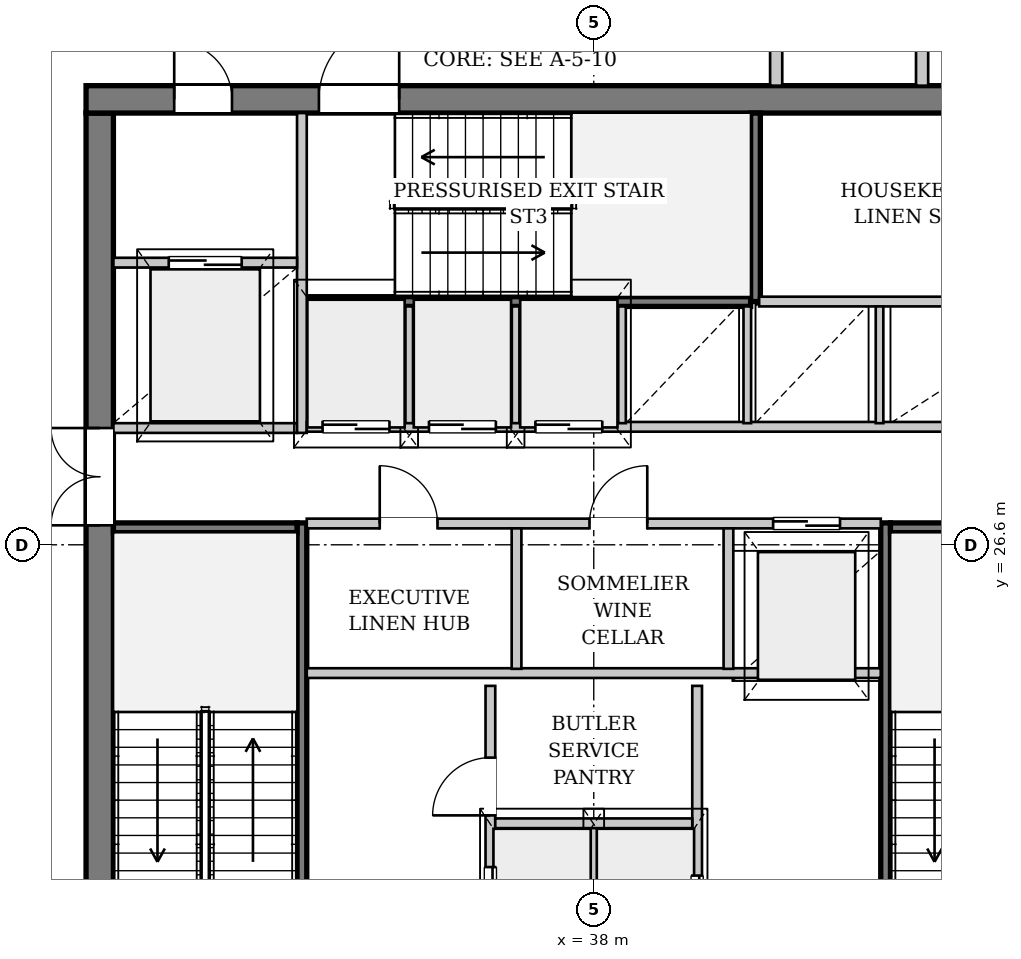
"""IFC4 building model, lengths in metres.
Left out: names, types, materials, properties, quantities, classifications, styles, units other than length and angle.
Written with IfcOpenShell. Run it as: python <this file> out.ifc"""

import sys

from ifc_helpers import new_model, si_unit, direction, frame, frame_2d, origin, place, context, subcontext, project, spatial, rectangle, extrude, source, transform, mapped, element, fill, save


model = new_model("IFC4")
c1 = context("Model", 3, precision=1e-05, world=origin(), true_north=direction((0.0, 1.0)))
c2 = subcontext(c1, "Body", "Model", "MODEL_VIEW")
j1 = project(units=[si_unit("LENGTHUNIT", "METRE"), si_unit("PLANEANGLEUNIT", "RADIAN")], contexts=[c1])
p1 = place(None, origin())
s1 = spatial("IfcSite", under=j1, at=p1, CompositionType="ELEMENT")
p2 = place(p1, origin())
s2 = spatial("IfcBuilding", under=s1, at=p2, CompositionType="ELEMENT")
p3 = place(p2, frame((0.0, 0.0, 213.15)))
s3 = spatial("IfcBuildingStorey", under=s2, at=p3, CompositionType="ELEMENT", Elevation=213.15)
p4 = place(p3, frame((52.923, 23.425, 0.0), z_axis=(0.0, 0.0, 1.0), x_axis=(-0.482829200204, -0.875714544489, 0.0)))
e1 = element("IfcWall", 1, at=p4, inside=s3, PredefinedType="SOLIDWALL", context=c2, shape_type="SweptSolid", body=[
    extrude(rectangle(XDim=23.072, YDim=0.32, at=frame_2d((11.536, 0.0))), origin(), (0.0, 0.0, 1.0), 2.822),
])
p5 = place(p4, frame((6.633, 0.0, 0.0)))
e2 = element("IfcOpeningElement", 2, at=p5, cuts=e1, PredefinedType="OPENING", context=c2, shape_type="SweptSolid", body=[
    extrude(rectangle(XDim=1.5, YDim=2.3, at=frame_2d((0.75, 1.15))), frame((0.0, 0.17, 0.0), z_axis=(0.0, -1.0, 0.0), x_axis=(1.0, 0.0, 0.0)), (0.0, 0.0, 1.0), 0.34),
])
p6 = place(p4, frame((15.773, 0.0, 0.352)))
e3 = element("IfcOpeningElement", 3, at=p6, cuts=e1, PredefinedType="OPENING", context=c2, shape_type="SweptSolid", body=[
    extrude(rectangle(XDim=2.6, YDim=2.35, at=frame_2d((1.3, 1.175))), frame((0.0, 0.17, 0.0), z_axis=(0.0, -1.0, 0.0), x_axis=(1.0, 0.0, 0.0)), (0.0, 0.0, 1.0), 0.34),
])
p7 = place(p3, frame((15.745, 32.294, 0.0), z_axis=(0.0, 0.0, 1.0), x_axis=(0.900909174289, 0.434007672377, 0.0)))
e4 = element("IfcWall", 4, at=p7, inside=s3, PredefinedType="SOLIDWALL", context=c2, shape_type="SweptSolid", body=[
    extrude(rectangle(XDim=22.511, YDim=0.38, at=frame_2d((11.256, 0.0))), origin(), (0.0, 0.0, 1.0), 2.822),
])
p8 = place(p7, frame((5.653, 0.0, 0.452)))
e5 = element("IfcOpeningElement", 5, at=p8, cuts=e4, PredefinedType="OPENING", context=c2, shape_type="SweptSolid", body=[
    extrude(rectangle(XDim=2.2, YDim=2.25, at=frame_2d((1.1, 1.125))), frame((0.0, 0.2, 0.0), z_axis=(0.0, -1.0, 0.0), x_axis=(1.0, 0.0, 0.0)), (0.0, 0.0, 1.0), 0.4),
])
p9 = place(p7, frame((15.108, 0.0, 0.452)))
e6 = element("IfcOpeningElement", 6, at=p9, cuts=e4, PredefinedType="OPENING", context=c2, shape_type="SweptSolid", body=[
    extrude(rectangle(XDim=2.2, YDim=2.25, at=frame_2d((1.1, 1.125))), frame((0.0, 0.2, 0.0), z_axis=(0.0, -1.0, 0.0), x_axis=(1.0, 0.0, 0.0)), (0.0, 0.0, 1.0), 0.4),
])
p10 = place(p3, frame((42.991, 3.451, 0.0), z_axis=(0.0, 0.0, 1.0), x_axis=(0.477647289854, 0.878551686866, 0.0)))
e7 = element("IfcWall", 7, at=p10, inside=s3, PredefinedType="PARAPET", context=c2, shape_type="SweptSolid", body=[
    extrude(rectangle(XDim=20.551, YDim=0.22, at=frame_2d((10.275, 0.0))), origin(), (0.0, 0.0, 1.0), 0.3),
])
p11 = place(p3, frame((29.875, 19.5, 0.0), z_axis=(0.0, 0.0, 1.0), x_axis=(0.0, 1.0, 0.0)))
e8 = element("IfcWall", 8, at=p11, inside=s3, PredefinedType="SHEAR", context=c2, shape_type="SweptSolid", body=[
    extrude(rectangle(XDim=14.2, YDim=0.45, at=frame_2d((7.1, 0.0))), origin(), (0.0, 0.0, 1.0), 3.33),
])
p12 = place(p11, frame((7.42, 0.0, 0.0)))
e9 = element("IfcOpeningElement", 9, at=p12, cuts=e8, PredefinedType="OPENING", context=c2, shape_type="SweptSolid", body=[
    extrude(rectangle(XDim=1.6, YDim=2.2, at=frame_2d((0.8, 1.1))), frame((0.0, 0.235, 0.0), z_axis=(0.0, -1.0, 0.0), x_axis=(1.0, 0.0, 0.0)), (0.0, 0.0, 1.0), 0.47),
])
p13 = place(p3, frame((29.65, 33.925, 0.0), z_axis=(0.0, 0.0, 1.0), x_axis=(1.0, 0.0, 0.0)))
e10 = element("IfcWall", 10, at=p13, inside=s3, PredefinedType="SHEAR", context=c2, shape_type="SweptSolid", body=[
    extrude(rectangle(XDim=16.7, YDim=0.45, at=frame_2d((8.35, 0.0))), origin(), (0.0, 0.0, 1.0), 3.33),
])
p14 = place(p13, frame((1.45, 0.0, 0.0)))
e11 = element("IfcOpeningElement", 11, at=p14, cuts=e10, PredefinedType="OPENING", context=c2, shape_type="SweptSolid", body=[
    extrude(rectangle(XDim=0.95, YDim=2.1, at=frame_2d((0.475, 1.05))), frame((0.0, 0.235, 0.0), z_axis=(0.0, -1.0, 0.0), x_axis=(1.0, 0.0, 0.0)), (0.0, 0.0, 1.0), 0.47),
])
p15 = place(p13, frame((3.83, 0.0, 0.0)))
e12 = element("IfcOpeningElement", 12, at=p15, cuts=e10, PredefinedType="OPENING", context=c2, shape_type="SweptSolid", body=[
    extrude(rectangle(XDim=1.32, YDim=2.2, at=frame_2d((0.66, 1.1))), frame((0.0, 0.235, 0.0), z_axis=(0.0, -1.0, 0.0), x_axis=(1.0, 0.0, 0.0)), (0.0, 0.0, 1.0), 0.47),
])
p16 = place(p3, frame((33.2, 19.5, 0.0), z_axis=(0.0, 0.0, 1.0), x_axis=(0.0, 1.0, 0.0)))
e13 = element("IfcWall", 13, at=p16, inside=s3, PredefinedType="PARTITIONING", context=c2, shape_type="SweptSolid", body=[
    extrude(rectangle(XDim=7.46, YDim=0.16, at=frame_2d((3.73, 0.0))), origin(), (0.0, 0.0, 1.0), 3.33),
])
p17 = place(p16, frame((0.08, 0.0, 0.0)))
e14 = element("IfcOpeningElement", 14, at=p17, cuts=e13, PredefinedType="OPENING", context=c2, shape_type="SweptSolid", body=[
    extrude(rectangle(XDim=1.32, YDim=2.2, at=frame_2d((0.66, 1.1))), frame((0.0, 0.09, 0.0), z_axis=(0.0, -1.0, 0.0), x_axis=(1.0, 0.0, 0.0)), (0.0, 0.0, 1.0), 0.18),
])
p18 = place(p3, frame((30.1, 26.88, 0.0), z_axis=(0.0, 0.0, 1.0), x_axis=(1.0, 0.0, 0.0)))
e15 = element("IfcWall", 15, at=p18, inside=s3, PredefinedType="PARTITIONING", context=c2, shape_type="SweptSolid", body=[
    extrude(rectangle(XDim=3.02, YDim=0.16, at=frame_2d((1.51, 0.0))), origin(), (0.0, 0.0, 1.0), 3.33),
])
p19 = place(p3, frame((42.8, 26.96, 0.0), z_axis=(0.0, 0.0, 1.0), x_axis=(0.0, -1.0, 0.0)))
e16 = element("IfcWall", 16, at=p19, inside=s3, PredefinedType="PARTITIONING", context=c2, shape_type="SweptSolid", body=[
    extrude(rectangle(XDim=7.46, YDim=0.16, at=frame_2d((3.73, 0.0))), origin(), (0.0, 0.0, 1.0), 3.33),
])
p20 = place(p19, frame((6.06, 0.0, 0.0)))
e17 = element("IfcOpeningElement", 17, at=p20, cuts=e16, PredefinedType="OPENING", context=c2, shape_type="SweptSolid", body=[
    extrude(rectangle(XDim=1.32, YDim=2.2, at=frame_2d((0.66, 1.1))), frame((0.0, 0.09, 0.0), z_axis=(0.0, -1.0, 0.0), x_axis=(1.0, 0.0, 0.0)), (0.0, 0.0, 1.0), 0.18),
])
p21 = place(p3, frame((42.88, 26.88, 0.0), z_axis=(0.0, 0.0, 1.0), x_axis=(1.0, 0.0, 0.0)))
e18 = element("IfcWall", 18, at=p21, inside=s3, PredefinedType="PARTITIONING", context=c2, shape_type="SweptSolid", body=[
    extrude(rectangle(XDim=3.02, YDim=0.16, at=frame_2d((1.51, 0.0))), origin(), (0.0, 0.0, 1.0), 3.33),
])
p22 = place(p3, frame((33.28, 30.6, 0.0), z_axis=(0.0, 0.0, 1.0), x_axis=(1.0, 0.0, 0.0)))
e19 = element("IfcWall", 19, at=p22, inside=s3, PredefinedType="PARTITIONING", context=c2, shape_type="SweptSolid", body=[
    extrude(rectangle(XDim=7.3, YDim=0.16, at=frame_2d((3.65, 0.0))), origin(), (0.0, 0.0, 1.0), 3.33),
])
p23 = place(p3, frame((40.66, 30.6, 0.0), z_axis=(0.0, 0.0, 1.0), x_axis=(0.0, 1.0, 0.0)))
e20 = element("IfcWall", 20, at=p23, inside=s3, PredefinedType="PARTITIONING", context=c2, shape_type="SweptSolid", body=[
    extrude(rectangle(XDim=3.1, YDim=0.16, at=frame_2d((1.55, 0.0))), origin(), (0.0, 0.0, 1.0), 3.33),
])
p24 = place(p3, frame((36.3, 19.5, 0.0), z_axis=(0.0, 0.0, 1.0), x_axis=(0.0, 1.0, 0.0)))
e21 = element("IfcWall", 21, at=p24, inside=s3, PredefinedType="PARTITIONING", context=c2, shape_type="SweptSolid", body=[
    extrude(rectangle(XDim=4.78, YDim=0.16, at=frame_2d((2.39, 0.0))), origin(), (0.0, 0.0, 1.0), 3.33),
])
p25 = place(p24, frame((0.6, 0.0, 0.0)))
e22 = element("IfcOpeningElement", 22, at=p25, cuts=e21, PredefinedType="OPENING", context=c2, shape_type="SweptSolid", body=[
    extrude(rectangle(XDim=1.2, YDim=2.2, at=frame_2d((0.6, 1.1))), frame((0.0, 0.09, 0.0), z_axis=(0.0, -1.0, 0.0), x_axis=(1.0, 0.0, 0.0)), (0.0, 0.0, 1.0), 0.18),
])
p26 = place(p24, frame((2.65, 0.0, 0.0)))
e23 = element("IfcOpeningElement", 23, at=p26, cuts=e21, PredefinedType="OPENING", context=c2, shape_type="SweptSolid", body=[
    extrude(rectangle(XDim=0.95, YDim=2.1, at=frame_2d((0.475, 1.05))), frame((0.0, 0.09, 0.0), z_axis=(0.0, -1.0, 0.0), x_axis=(1.0, 0.0, 0.0)), (0.0, 0.0, 1.0), 0.18),
])
p27 = place(p3, frame((39.7, 24.28, 0.0), z_axis=(0.0, 0.0, 1.0), x_axis=(0.0, -1.0, 0.0)))
e24 = element("IfcWall", 24, at=p27, inside=s3, PredefinedType="PARTITIONING", context=c2, shape_type="SweptSolid", body=[
    extrude(rectangle(XDim=4.78, YDim=0.16, at=frame_2d((2.39, 0.0))), origin(), (0.0, 0.0, 1.0), 3.33),
])
p28 = place(p27, frame((3.12, 0.0, 0.0)))
e25 = element("IfcOpeningElement", 25, at=p28, cuts=e24, PredefinedType="OPENING", context=c2, shape_type="SweptSolid", body=[
    extrude(rectangle(XDim=1.2, YDim=2.2, at=frame_2d((0.6, 1.1))), frame((0.0, 0.09, 0.0), z_axis=(0.0, -1.0, 0.0), x_axis=(1.0, 0.0, 0.0)), (0.0, 0.0, 1.0), 0.18),
])
p29 = place(p3, frame((38.0, 19.5, 0.0), z_axis=(0.0, 0.0, 1.0), x_axis=(0.0, 1.0, 0.0)))
e26 = element("IfcWall", 26, at=p29, inside=s3, PredefinedType="PARTITIONING", context=c2, shape_type="SweptSolid", body=[
    extrude(rectangle(XDim=2.46, YDim=0.125, at=frame_2d((1.23, 0.0))), origin(), (0.0, 0.0, 1.0), 3.33),
])
p30 = place(p3, frame((36.38, 22.02, 0.0), z_axis=(0.0, 0.0, 1.0), x_axis=(1.0, 0.0, 0.0)))
e27 = element("IfcWall", 27, at=p30, inside=s3, PredefinedType="PARTITIONING", context=c2, shape_type="SweptSolid", body=[
    extrude(rectangle(XDim=3.24, YDim=0.16, at=frame_2d((1.62, 0.0))), origin(), (0.0, 0.0, 1.0), 3.33),
])
p31 = place(p3, frame((33.28, 24.49, 0.0), z_axis=(0.0, 0.0, 1.0), x_axis=(1.0, 0.0, 0.0)))
e28 = element("IfcWall", 28, at=p31, inside=s3, PredefinedType="PARTITIONING", context=c2, shape_type="SweptSolid", body=[
    extrude(rectangle(XDim=9.44, YDim=0.16, at=frame_2d((4.72, 0.0))), origin(), (0.0, 0.0, 1.0), 3.33),
])
p32 = place(p3, frame((30.1, 28.52, 0.0), z_axis=(0.0, 0.0, 1.0), x_axis=(1.0, 0.0, 0.0)))
e29 = element("IfcWall", 29, at=p32, inside=s3, PredefinedType="PARTITIONING", context=c2, shape_type="SweptSolid", body=[
    extrude(rectangle(XDim=3.02, YDim=0.16, at=frame_2d((1.51, 0.0))), origin(), (0.0, 0.0, 1.0), 3.33),
])
p33 = place(p3, frame((33.2, 28.44, 0.0), z_axis=(0.0, 0.0, 1.0), x_axis=(0.0, 1.0, 0.0)))
e30 = element("IfcWall", 30, at=p33, inside=s3, PredefinedType="PARTITIONING", context=c2, shape_type="SweptSolid", body=[
    extrude(rectangle(XDim=5.26, YDim=0.16, at=frame_2d((2.63, 0.0))), origin(), (0.0, 0.0, 1.0), 3.33),
])
p34 = place(p3, frame((30.1, 31.24, 0.0), z_axis=(0.0, 0.0, 1.0), x_axis=(1.0, 0.0, 0.0)))
e31 = element("IfcWall", 31, at=p34, inside=s3, PredefinedType="PARTITIONING", context=c2, shape_type="SweptSolid", body=[
    extrude(rectangle(XDim=3.02, YDim=0.16, at=frame_2d((1.51, 0.0))), origin(), (0.0, 0.0, 1.0), 3.33),
])
p35 = place(p34, frame((0.91, 0.0, 0.0)))
e32 = element("IfcOpeningElement", 32, at=p35, cuts=e31, PredefinedType="OPENING", context=c2, shape_type="SweptSolid", body=[
    extrude(rectangle(XDim=1.2, YDim=2.2, at=frame_2d((0.6, 1.1))), frame((0.0, 0.09, 0.0), z_axis=(0.0, -1.0, 0.0), x_axis=(1.0, 0.0, 0.0)), (0.0, 0.0, 1.0), 0.18),
])
p36 = place(p3, frame((33.28, 26.95, 0.0), z_axis=(0.0, 0.0, 1.0), x_axis=(1.0, 0.0, 0.0)))
e33 = element("IfcWall", 33, at=p36, inside=s3, PredefinedType="PARTITIONING", context=c2, shape_type="SweptSolid", body=[
    extrude(rectangle(XDim=9.44, YDim=0.16, at=frame_2d((4.72, 0.0))), origin(), (0.0, 0.0, 1.0), 3.33),
])
p37 = place(p36, frame((1.2, 0.0, 0.0)))
e34 = element("IfcOpeningElement", 34, at=p37, cuts=e33, PredefinedType="OPENING", context=c2, shape_type="SweptSolid", body=[
    extrude(rectangle(XDim=0.95, YDim=2.1, at=frame_2d((0.475, 1.05))), frame((0.0, 0.09, 0.0), z_axis=(0.0, -1.0, 0.0), x_axis=(1.0, 0.0, 0.0)), (0.0, 0.0, 1.0), 0.18),
])
p38 = place(p36, frame((4.65, 0.0, 0.0)))
e35 = element("IfcOpeningElement", 35, at=p38, cuts=e33, PredefinedType="OPENING", context=c2, shape_type="SweptSolid", body=[
    extrude(rectangle(XDim=0.95, YDim=2.1, at=frame_2d((0.475, 1.05))), frame((0.0, 0.09, 0.0), z_axis=(0.0, -1.0, 0.0), x_axis=(1.0, 0.0, 0.0)), (0.0, 0.0, 1.0), 0.18),
])
p39 = place(p36, frame((7.67, 0.0, 0.0)))
e36 = element("IfcOpeningElement", 36, at=p39, cuts=e33, PredefinedType="OPENING", context=c2, shape_type="SweptSolid", body=[
    extrude(rectangle(XDim=1.1, YDim=2.2, at=frame_2d((0.55, 1.1))), frame((0.0, 0.09, 0.0), z_axis=(0.0, -1.0, 0.0), x_axis=(1.0, 0.0, 0.0)), (0.0, 0.0, 1.0), 0.18),
])
for number, where, z_axis, x_axis in (
    (37, (36.73, 24.56, 0.0), (0.0, 0.0, 1.0), (0.0, 1.0, 0.0)),
    (38, (40.215, 24.56, 0.0), (0.0, 0.0, 1.0), (0.0, 1.0, 0.0)),
):
    element("IfcWall", number, at=place(p3, frame(where, z_axis=z_axis, x_axis=x_axis)), inside=s3, PredefinedType="PARTITIONING", context=c2, shape_type="SweptSolid", body=[
        extrude(rectangle(XDim=2.31, YDim=0.16, at=frame_2d((1.155, 0.0))), origin(), (0.0, 0.0, 1.0), 3.33),
    ])
p40 = place(p3, frame((33.28, 28.54, 0.0), z_axis=(0.0, 0.0, 1.0), x_axis=(1.0, 0.0, 0.0)))
e39 = element("IfcWall", 39, at=p40, inside=s3, PredefinedType="PARTITIONING", context=c2, shape_type="SweptSolid", body=[
    extrude(rectangle(XDim=12.62, YDim=0.16, at=frame_2d((6.31, 0.0))), origin(), (0.0, 0.0, 1.0), 3.33),
])
p41 = place(p40, frame((0.26, 0.0, 0.0)))
e40 = element("IfcOpeningElement", 40, at=p41, cuts=e39, PredefinedType="OPENING", context=c2, shape_type="SweptSolid", body=[
    extrude(rectangle(XDim=1.1, YDim=2.2, at=frame_2d((0.55, 1.1))), frame((0.0, 0.09, 0.0), z_axis=(0.0, -1.0, 0.0), x_axis=(1.0, 0.0, 0.0)), (0.0, 0.0, 1.0), 0.18),
])
p42 = place(p40, frame((2.01, 0.0, 0.0)))
e41 = element("IfcOpeningElement", 41, at=p42, cuts=e39, PredefinedType="OPENING", context=c2, shape_type="SweptSolid", body=[
    extrude(rectangle(XDim=1.1, YDim=2.2, at=frame_2d((0.55, 1.1))), frame((0.0, 0.09, 0.0), z_axis=(0.0, -1.0, 0.0), x_axis=(1.0, 0.0, 0.0)), (0.0, 0.0, 1.0), 0.18),
])
p43 = place(p40, frame((3.76, 0.0, 0.0)))
e42 = element("IfcOpeningElement", 42, at=p43, cuts=e39, PredefinedType="OPENING", context=c2, shape_type="SweptSolid", body=[
    extrude(rectangle(XDim=1.1, YDim=2.2, at=frame_2d((0.55, 1.1))), frame((0.0, 0.09, 0.0), z_axis=(0.0, -1.0, 0.0), x_axis=(1.0, 0.0, 0.0)), (0.0, 0.0, 1.0), 0.18),
])
p44 = place(p3, frame((40.72, 30.6, 0.0), z_axis=(0.0, 0.0, 1.0), x_axis=(1.0, 0.0, 0.0)))
e43 = element("IfcWall", 43, at=p44, inside=s3, PredefinedType="PARTITIONING", context=c2, shape_type="SweptSolid", body=[
    extrude(rectangle(XDim=5.18, YDim=0.16, at=frame_2d((2.59, 0.0))), origin(), (0.0, 0.0, 1.0), 3.33),
])
for number, where, z_axis, x_axis in (
    (44, (34.965, 28.6, 0.0), (0.0, 0.0, 1.0), (0.0, 1.0, 0.0)),
    (45, (36.715, 28.6, 0.0), (0.0, 0.0, 1.0), (0.0, 1.0, 0.0)),
    (46, (38.465, 28.6, 0.0), (0.0, 0.0, 1.0), (0.0, 1.0, 0.0)),
    (47, (40.525, 28.6, 0.0), (0.0, 0.0, 1.0), (0.0, 1.0, 0.0)),
    (48, (42.7, 28.6, 0.0), (0.0, 0.0, 1.0), (0.0, 1.0, 0.0)),
):
    element("IfcWall", number, at=place(p3, frame(where, z_axis=z_axis, x_axis=x_axis)), inside=s3, PredefinedType="PARTITIONING", context=c2, shape_type="SweptSolid", body=[
        extrude(rectangle(XDim=1.92, YDim=0.125, at=frame_2d((0.96, 0.0))), origin(), (0.0, 0.0, 1.0), 3.33),
    ])
for number, where, z_axis, x_axis in (
    (49, (41.0, 34.15, 0.0), (0.0, 0.0, 1.0), (0.0, 1.0, 0.0)),
    (50, (43.4, 34.15, 0.0), (0.0, 0.0, 1.0), (0.0, 1.0, 0.0)),
):
    element("IfcWall", number, at=place(p3, frame(where, z_axis=z_axis, x_axis=x_axis)), inside=s3, PredefinedType="PARTITIONING", context=c2, shape_type="SweptSolid", body=[
        extrude(rectangle(XDim=1.85, YDim=0.2, at=frame_2d((0.925, 0.0))), origin(), (0.0, 0.0, 1.0), 3.33),
    ])
m1 = source(origin(), c2, "Body", "SweptSolid", [
    extrude(rectangle(XDim=1.6, YDim=2.2, at=frame_2d((0.8, 1.1))), frame((0.0, 0.025, 0.0), z_axis=(0.0, -1.0, 0.0), x_axis=(1.0, 0.0, 0.0)), (0.0, 0.0, 1.0), 0.05),
])
p45 = place(p12, origin())
e51 = element("IfcDoor", 51, at=p45, inside=s3, OperationType="DOUBLE_DOOR_SINGLE_SWING", PredefinedType="DOOR", context=c2, shape_type="MappedRepresentation", body=[
    mapped(m1, transform((0.0, 0.0, 0.0), x_axis=(1.0, 0.0, 0.0), y_axis=(0.0, 1.0, 0.0), z_axis=(0.0, 0.0, 1.0), scale=1.0)),
])
fill(e9, e51)
m2 = source(origin(), c2, "Body", "SweptSolid", [
    extrude(rectangle(XDim=0.95, YDim=2.1, at=frame_2d((0.475, 1.05))), frame((0.0, 0.025, 0.0), z_axis=(0.0, -1.0, 0.0), x_axis=(1.0, 0.0, 0.0)), (0.0, 0.0, 1.0), 0.05),
])
p46 = place(p14, origin())
e52 = element("IfcDoor", 52, at=p46, inside=s3, OperationType="SINGLE_SWING_LEFT", PredefinedType="DOOR", context=c2, shape_type="MappedRepresentation", body=[
    mapped(m2, transform((0.0, 0.0, 0.0), x_axis=(1.0, 0.0, 0.0), y_axis=(0.0, 1.0, 0.0), z_axis=(0.0, 0.0, 1.0), scale=1.0)),
])
fill(e11, e52)
m3 = source(origin(), c2, "Body", "SweptSolid", [
    extrude(rectangle(XDim=1.32, YDim=2.2, at=frame_2d((0.66, 1.1))), frame((0.0, 0.025, 0.0), z_axis=(0.0, -1.0, 0.0), x_axis=(1.0, 0.0, 0.0)), (0.0, 0.0, 1.0), 0.05),
])
p47 = place(p15, origin())
e53 = element("IfcDoor", 53, at=p47, inside=s3, OperationType="SINGLE_SWING_RIGHT", PredefinedType="DOOR", context=c2, shape_type="MappedRepresentation", body=[
    mapped(m3, transform((0.0, 0.0, 0.0), x_axis=(1.0, 0.0, 0.0), y_axis=(0.0, 1.0, 0.0), z_axis=(0.0, 0.0, 1.0), scale=1.0)),
])
fill(e12, e53)
m4 = source(origin(), c2, "Body", "SweptSolid", [
    extrude(rectangle(XDim=1.2, YDim=2.2, at=frame_2d((0.6, 1.1))), frame((0.0, 0.025, 0.0), z_axis=(0.0, -1.0, 0.0), x_axis=(1.0, 0.0, 0.0)), (0.0, 0.0, 1.0), 0.05),
])
p48 = place(p25, origin())
e54 = element("IfcDoor", 54, at=p48, inside=s3, OperationType="DOUBLE_DOOR_SLIDING", PredefinedType="DOOR", context=c2, shape_type="MappedRepresentation", body=[
    mapped(m4, transform((0.0, 0.0, 0.0), x_axis=(1.0, 0.0, 0.0), y_axis=(0.0, 1.0, 0.0), z_axis=(0.0, 0.0, 1.0), scale=1.0)),
])
fill(e22, e54)
p49 = place(p26, origin())
e55 = element("IfcDoor", 55, at=p49, inside=s3, OperationType="SINGLE_SWING_LEFT", PredefinedType="DOOR", context=c2, shape_type="MappedRepresentation", body=[
    mapped(m2, transform((0.0, 0.0, 0.0), x_axis=(1.0, 0.0, 0.0), y_axis=(0.0, 1.0, 0.0), z_axis=(0.0, 0.0, 1.0), scale=1.0)),
])
fill(e23, e55)
p50 = place(p28, origin())
e56 = element("IfcDoor", 56, at=p50, inside=s3, OperationType="DOUBLE_DOOR_SLIDING", PredefinedType="DOOR", context=c2, shape_type="MappedRepresentation", body=[
    mapped(m4, transform((0.0, 0.0, 0.0), x_axis=(1.0, 0.0, 0.0), y_axis=(0.0, 1.0, 0.0), z_axis=(0.0, 0.0, 1.0), scale=1.0)),
])
fill(e25, e56)
p51 = place(p35, origin())
e57 = element("IfcDoor", 57, at=p51, inside=s3, OperationType="DOUBLE_DOOR_SLIDING", PredefinedType="DOOR", context=c2, shape_type="MappedRepresentation", body=[
    mapped(m4, transform((0.0, 0.0, 0.0), x_axis=(1.0, 0.0, 0.0), y_axis=(0.0, 1.0, 0.0), z_axis=(0.0, 0.0, 1.0), scale=1.0)),
])
fill(e32, e57)
p52 = place(p37, origin())
e58 = element("IfcDoor", 58, at=p52, inside=s3, OperationType="SINGLE_SWING_LEFT", PredefinedType="DOOR", context=c2, shape_type="MappedRepresentation", body=[
    mapped(m2, transform((0.0, 0.0, 0.0), x_axis=(1.0, 0.0, 0.0), y_axis=(0.0, 1.0, 0.0), z_axis=(0.0, 0.0, 1.0), scale=1.0)),
])
fill(e34, e58)
p53 = place(p38, origin())
e59 = element("IfcDoor", 59, at=p53, inside=s3, OperationType="SINGLE_SWING_RIGHT", PredefinedType="DOOR", context=c2, shape_type="MappedRepresentation", body=[
    mapped(m2, transform((0.0, 0.0, 0.0), x_axis=(1.0, 0.0, 0.0), y_axis=(0.0, 1.0, 0.0), z_axis=(0.0, 0.0, 1.0), scale=1.0)),
])
fill(e35, e59)
m5 = source(origin(), c2, "Body", "SweptSolid", [
    extrude(rectangle(XDim=1.1, YDim=2.2, at=frame_2d((0.55, 1.1))), frame((0.0, 0.025, 0.0), z_axis=(0.0, -1.0, 0.0), x_axis=(1.0, 0.0, 0.0)), (0.0, 0.0, 1.0), 0.05),
])
p54 = place(p39, origin())
e60 = element("IfcDoor", 60, at=p54, inside=s3, OperationType="DOUBLE_DOOR_SLIDING", PredefinedType="DOOR", context=c2, shape_type="MappedRepresentation", body=[
    mapped(m5, transform((0.0, 0.0, 0.0), x_axis=(1.0, 0.0, 0.0), y_axis=(0.0, 1.0, 0.0), z_axis=(0.0, 0.0, 1.0), scale=1.0)),
])
fill(e36, e60)
p55 = place(p41, origin())
e61 = element("IfcDoor", 61, at=p55, inside=s3, OperationType="DOUBLE_DOOR_SLIDING", PredefinedType="DOOR", context=c2, shape_type="MappedRepresentation", body=[
    mapped(m5, transform((0.0, 0.0, 0.0), x_axis=(1.0, 0.0, 0.0), y_axis=(0.0, 1.0, 0.0), z_axis=(0.0, 0.0, 1.0), scale=1.0)),
])
fill(e40, e61)
p56 = place(p42, origin())
e62 = element("IfcDoor", 62, at=p56, inside=s3, OperationType="DOUBLE_DOOR_SLIDING", PredefinedType="DOOR", context=c2, shape_type="MappedRepresentation", body=[
    mapped(m5, transform((0.0, 0.0, 0.0), x_axis=(1.0, 0.0, 0.0), y_axis=(0.0, 1.0, 0.0), z_axis=(0.0, 0.0, 1.0), scale=1.0)),
])
fill(e41, e62)
p57 = place(p43, origin())
e63 = element("IfcDoor", 63, at=p57, inside=s3, OperationType="DOUBLE_DOOR_SLIDING", PredefinedType="DOOR", context=c2, shape_type="MappedRepresentation", body=[
    mapped(m5, transform((0.0, 0.0, 0.0), x_axis=(1.0, 0.0, 0.0), y_axis=(0.0, 1.0, 0.0), z_axis=(0.0, 0.0, 1.0), scale=1.0)),
])
fill(e42, e63)
save(model, sys.argv[1])
